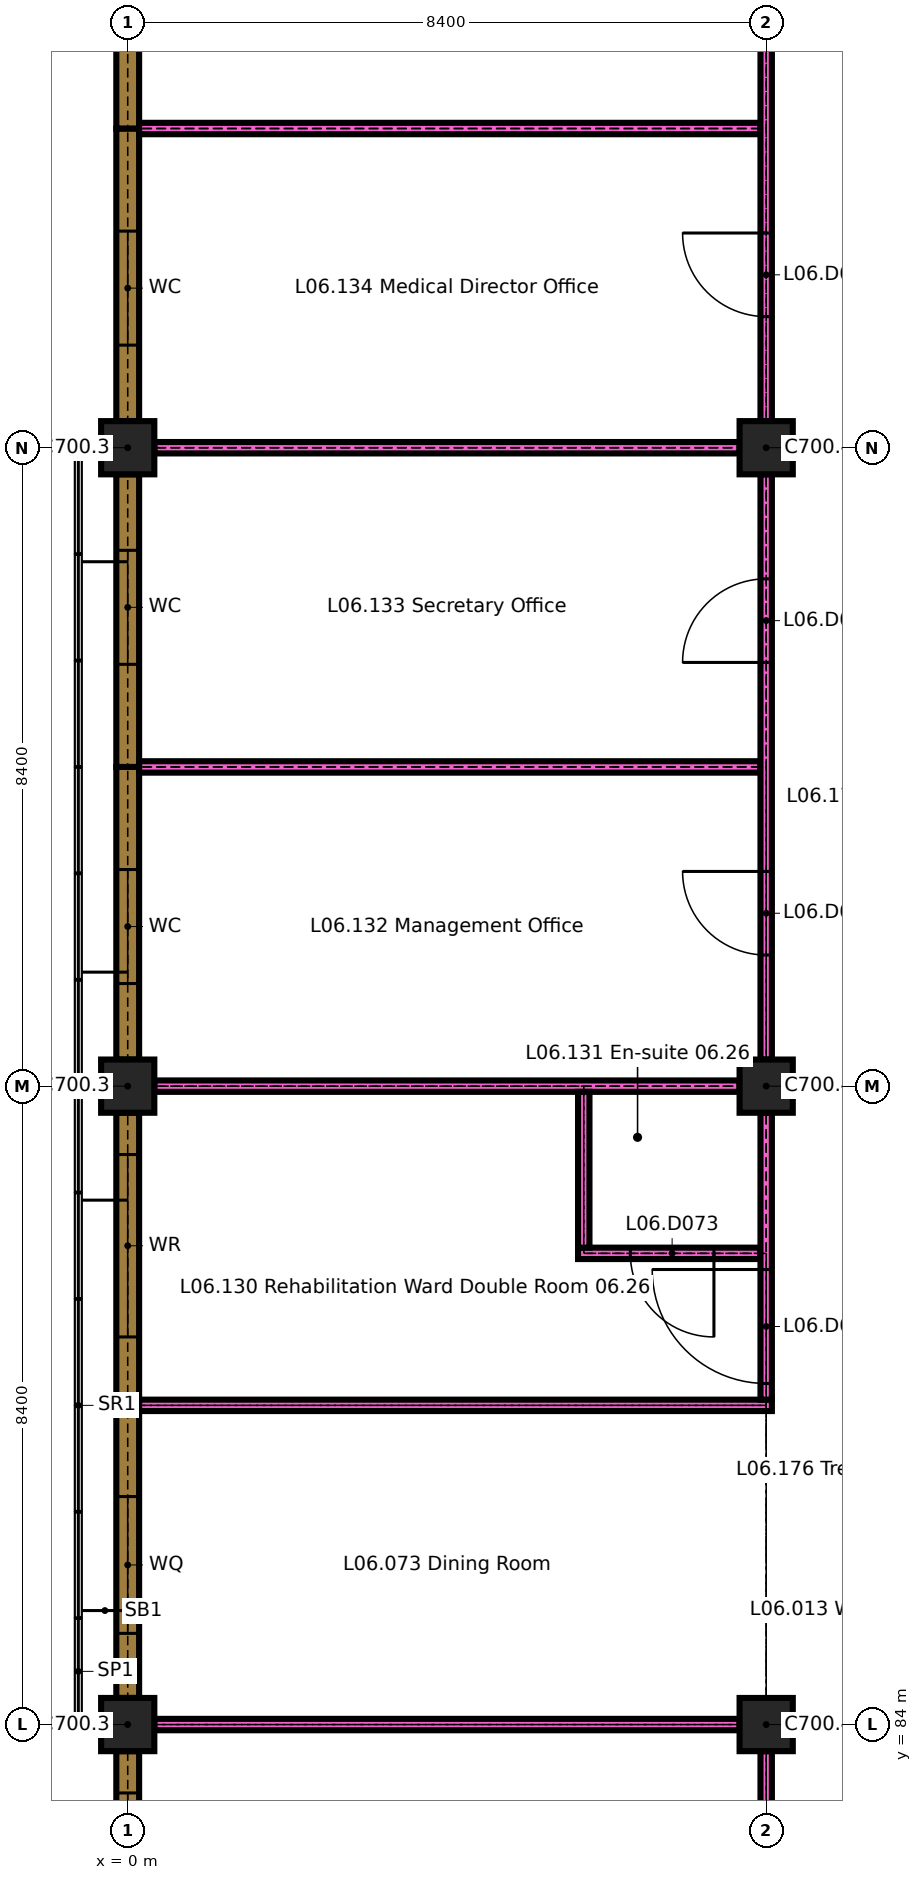
"""IFC4 building model, lengths in metres.
Left out: names, types, materials, properties, quantities, classifications, styles, units other than length and angle.
Written with IfcOpenShell. Run it as: python <this file> out.ifc"""

import sys

from ifc_helpers import new_model, si_unit, direction, frame, frame_2d, origin, origin_2d, place, context, subcontext, project, spatial, rectangle, extrude, element, fill, save


model = new_model("IFC4")
c1 = context("Model", 3, precision=1e-05, world=origin(), true_north=direction((0.0, 1.0)))
c2 = subcontext(c1, "Body", "Model", "MODEL_VIEW")
j1 = project(units=[si_unit("LENGTHUNIT", "METRE"), si_unit("PLANEANGLEUNIT", "RADIAN")], contexts=[c1])
p1 = place(None, origin())
s1 = spatial("IfcSite", under=j1, at=p1, CompositionType="ELEMENT")
p2 = place(p1, origin())
s2 = spatial("IfcBuilding", under=s1, at=p2, CompositionType="ELEMENT")
p3 = place(p2, frame((0.0, 0.0, 26.1)))
s3 = spatial("IfcBuildingStorey", under=s2, at=p3, CompositionType="ELEMENT", Elevation=26.1)
p4 = place(p3, frame((0.0, 84.0, 0.0), z_axis=(0.0, 0.0, 1.0), x_axis=(1.0, 0.0, 0.0)))
e1 = element("IfcColumn", 1, at=p4, inside=s3, PredefinedType="COLUMN", context=c2, shape_type="SweptSolid", body=[
    extrude(rectangle(XDim=0.7, YDim=0.7, at=origin_2d()), origin(), (0.0, 0.0, 1.0), 3.2),
])
p5 = place(p3, frame((8.4, 84.0, 0.0), z_axis=(0.0, 0.0, 1.0), x_axis=(1.0, 0.0, 0.0)))
e2 = element("IfcColumn", 2, at=p5, inside=s3, PredefinedType="COLUMN", context=c2, shape_type="SweptSolid", body=[
    extrude(rectangle(XDim=0.7, YDim=0.7, at=origin_2d()), origin(), (0.0, 0.0, 1.0), 3.3),
])
p6 = place(p3, frame((0.0, 92.4, 0.0), z_axis=(0.0, 0.0, 1.0), x_axis=(1.0, 0.0, 0.0)))
e3 = element("IfcColumn", 3, at=p6, inside=s3, PredefinedType="COLUMN", context=c2, shape_type="SweptSolid", body=[
    extrude(rectangle(XDim=0.7, YDim=0.7, at=origin_2d()), origin(), (0.0, 0.0, 1.0), 3.2),
])
p7 = place(p3, frame((8.4, 92.4, 0.0), z_axis=(0.0, 0.0, 1.0), x_axis=(1.0, 0.0, 0.0)))
e4 = element("IfcColumn", 4, at=p7, inside=s3, PredefinedType="COLUMN", context=c2, shape_type="SweptSolid", body=[
    extrude(rectangle(XDim=0.7, YDim=0.7, at=origin_2d()), origin(), (0.0, 0.0, 1.0), 3.3),
])
p8 = place(p3, frame((0.0, 100.8, 0.0), z_axis=(0.0, 0.0, 1.0), x_axis=(1.0, 0.0, 0.0)))
e5 = element("IfcColumn", 5, at=p8, inside=s3, PredefinedType="COLUMN", context=c2, shape_type="SweptSolid", body=[
    extrude(rectangle(XDim=0.7, YDim=0.7, at=origin_2d()), origin(), (0.0, 0.0, 1.0), 3.2),
])
p9 = place(p3, frame((8.4, 100.8, 0.0), z_axis=(0.0, 0.0, 1.0), x_axis=(1.0, 0.0, 0.0)))
e6 = element("IfcColumn", 6, at=p9, inside=s3, PredefinedType="COLUMN", context=c2, shape_type="SweptSolid", body=[
    extrude(rectangle(XDim=0.7, YDim=0.7, at=origin_2d()), origin(), (0.0, 0.0, 1.0), 3.3),
])
p10 = place(p3, frame((0.0, 75.6, 0.0), z_axis=(0.0, 0.0, 1.0), x_axis=(0.0, 1.0, 0.0)))
e7 = element("IfcWall", 7, at=p10, inside=s3, PredefinedType="SOLIDWALL", context=c2, shape_type="SweptSolid", body=[
    extrude(rectangle(XDim=8.05, YDim=0.3, at=frame_2d((4.025, 0.0))), origin(), (0.0, 0.0, 1.0), 2.9),
])
p11 = place(p10, frame((0.9, 0.0, 0.6)))
e8 = element("IfcOpeningElement", 8, at=p11, cuts=e7, PredefinedType="OPENING", context=c2, shape_type="SweptSolid", body=[
    extrude(rectangle(XDim=2.4, YDim=1.8, at=frame_2d((1.2, 0.9))), frame((0.0, 0.16, 0.0), z_axis=(0.0, -1.0, 0.0), x_axis=(1.0, 0.0, 0.0)), (0.0, 0.0, 1.0), 0.32),
])
p12 = place(p10, frame((5.1, 0.0, 0.6)))
e9 = element("IfcOpeningElement", 9, at=p12, cuts=e7, PredefinedType="OPENING", context=c2, shape_type="SweptSolid", body=[
    extrude(rectangle(XDim=2.4, YDim=1.8, at=frame_2d((1.2, 0.9))), frame((0.0, 0.16, 0.0), z_axis=(0.0, -1.0, 0.0), x_axis=(1.0, 0.0, 0.0)), (0.0, 0.0, 1.0), 0.32),
])
p13 = place(p3, frame((0.0, 84.35, 0.0), z_axis=(0.0, 0.0, 1.0), x_axis=(0.0, 1.0, 0.0)))
e10 = element("IfcWall", 10, at=p13, inside=s3, PredefinedType="SOLIDWALL", context=c2, shape_type="SweptSolid", body=[
    extrude(rectangle(XDim=3.85, YDim=0.3, at=frame_2d((1.925, 0.0))), origin(), (0.0, 0.0, 1.0), 2.9),
])
p14 = place(p13, frame((0.85, 0.0, 1.05)))
e11 = element("IfcOpeningElement", 11, at=p14, cuts=e10, PredefinedType="OPENING", context=c2, shape_type="SweptSolid", body=[
    extrude(rectangle(XDim=1.8, YDim=1.2, at=frame_2d((0.9, 0.6))), frame((0.0, 0.16, 0.0), z_axis=(0.0, -1.0, 0.0), x_axis=(1.0, 0.0, 0.0)), (0.0, 0.0, 1.0), 0.32),
])
p15 = place(p3, frame((0.0, 88.2, 0.0), z_axis=(0.0, 0.0, 1.0), x_axis=(0.0, 1.0, 0.0)))
e12 = element("IfcWall", 12, at=p15, inside=s3, PredefinedType="SOLIDWALL", context=c2, shape_type="SweptSolid", body=[
    extrude(rectangle(XDim=3.85, YDim=0.3, at=frame_2d((1.925, 0.0))), origin(), (0.0, 0.0, 1.0), 2.9),
])
p16 = place(p15, frame((0.9, 0.0, 0.6)))
e13 = element("IfcOpeningElement", 13, at=p16, cuts=e12, PredefinedType="OPENING", context=c2, shape_type="SweptSolid", body=[
    extrude(rectangle(XDim=2.4, YDim=1.8, at=frame_2d((1.2, 0.9))), frame((0.0, 0.16, 0.0), z_axis=(0.0, -1.0, 0.0), x_axis=(1.0, 0.0, 0.0)), (0.0, 0.0, 1.0), 0.32),
])
p17 = place(p3, frame((0.0, 92.75, 0.0), z_axis=(0.0, 0.0, 1.0), x_axis=(0.0, 1.0, 0.0)))
e14 = element("IfcWall", 14, at=p17, inside=s3, PredefinedType="SOLIDWALL", context=c2, shape_type="SweptSolid", body=[
    extrude(rectangle(XDim=3.85, YDim=0.3, at=frame_2d((1.925, 0.0))), origin(), (0.0, 0.0, 1.0), 2.9),
])
p18 = place(p17, frame((1.0, 0.0, 0.9)))
e15 = element("IfcOpeningElement", 15, at=p18, cuts=e14, PredefinedType="OPENING", context=c2, shape_type="SweptSolid", body=[
    extrude(rectangle(XDim=1.5, YDim=1.5, at=frame_2d((0.75, 0.75))), frame((0.0, 0.16, 0.0), z_axis=(0.0, -1.0, 0.0), x_axis=(1.0, 0.0, 0.0)), (0.0, 0.0, 1.0), 0.32),
])
p19 = place(p3, frame((0.0, 96.6, 0.0), z_axis=(0.0, 0.0, 1.0), x_axis=(0.0, 1.0, 0.0)))
e16 = element("IfcWall", 16, at=p19, inside=s3, PredefinedType="SOLIDWALL", context=c2, shape_type="SweptSolid", body=[
    extrude(rectangle(XDim=3.85, YDim=0.3, at=frame_2d((1.925, 0.0))), origin(), (0.0, 0.0, 1.0), 2.9),
])
p20 = place(p19, frame((1.35, 0.0, 0.9)))
e17 = element("IfcOpeningElement", 17, at=p20, cuts=e16, PredefinedType="OPENING", context=c2, shape_type="SweptSolid", body=[
    extrude(rectangle(XDim=1.5, YDim=1.5, at=frame_2d((0.75, 0.75))), frame((0.0, 0.16, 0.0), z_axis=(0.0, -1.0, 0.0), x_axis=(1.0, 0.0, 0.0)), (0.0, 0.0, 1.0), 0.32),
])
p21 = place(p3, frame((0.0, 101.15, 0.0), z_axis=(0.0, 0.0, 1.0), x_axis=(0.0, 1.0, 0.0)))
e18 = element("IfcWall", 18, at=p21, inside=s3, PredefinedType="SOLIDWALL", context=c2, shape_type="SweptSolid", body=[
    extrude(rectangle(XDim=3.85, YDim=0.3, at=frame_2d((1.925, 0.0))), origin(), (0.0, 0.0, 1.0), 2.9),
])
p22 = place(p21, frame((1.0, 0.0, 0.9)))
e19 = element("IfcOpeningElement", 19, at=p22, cuts=e18, PredefinedType="OPENING", context=c2, shape_type="SweptSolid", body=[
    extrude(rectangle(XDim=1.5, YDim=1.5, at=frame_2d((0.75, 0.75))), frame((0.0, 0.16, 0.0), z_axis=(0.0, -1.0, 0.0), x_axis=(1.0, 0.0, 0.0)), (0.0, 0.0, 1.0), 0.32),
])
p23 = place(p3, frame((0.0, 105.0, 0.0), z_axis=(0.0, 0.0, 1.0), x_axis=(0.0, 1.0, 0.0)))
e20 = element("IfcWall", 20, at=p23, inside=s3, PredefinedType="SOLIDWALL", context=c2, shape_type="SweptSolid", body=[
    extrude(rectangle(XDim=3.85, YDim=0.3, at=frame_2d((1.925, 0.0))), origin(), (0.0, 0.0, 1.0), 2.9),
])
p24 = place(p23, frame((1.35, 0.0, 0.9)))
e21 = element("IfcOpeningElement", 21, at=p24, cuts=e20, PredefinedType="OPENING", context=c2, shape_type="SweptSolid", body=[
    extrude(rectangle(XDim=1.5, YDim=1.5, at=frame_2d((0.75, 0.75))), frame((0.0, 0.16, 0.0), z_axis=(0.0, -1.0, 0.0), x_axis=(1.0, 0.0, 0.0)), (0.0, 0.0, 1.0), 0.32),
])
p25 = place(p3, frame((0.35, 84.0, 0.0), z_axis=(0.0, 0.0, 1.0), x_axis=(1.0, 0.0, 0.0)))
e22 = element("IfcWall", 22, at=p25, inside=s3, PredefinedType="PARTITIONING", context=c2, shape_type="SweptSolid", body=[
    extrude(rectangle(XDim=7.7, YDim=0.15, at=frame_2d((3.85, 0.0))), origin(), (0.0, 0.0, 1.0), 3.3),
])
p26 = place(p3, frame((0.15, 88.2, 0.0), z_axis=(0.0, 0.0, 1.0), x_axis=(1.0, 0.0, 0.0)))
e23 = element("IfcWall", 23, at=p26, inside=s3, PredefinedType="PARTITIONING", context=c2, shape_type="SweptSolid", body=[
    extrude(rectangle(XDim=8.325, YDim=0.15, at=frame_2d((4.163, 0.0))), origin(), (0.0, 0.0, 1.0), 3.3),
])
p27 = place(p3, frame((5.925, 90.2, 0.0), z_axis=(0.0, 0.0, 1.0), x_axis=(1.0, 0.0, 0.0)))
e24 = element("IfcWall", 24, at=p27, inside=s3, PredefinedType="PARTITIONING", context=c2, shape_type="SweptSolid", body=[
    extrude(rectangle(XDim=2.4, YDim=0.15, at=frame_2d((1.2, 0.0))), origin(), (0.0, 0.0, 1.0), 3.3),
])
p28 = place(p27, frame((0.688, 0.0, 0.0)))
e25 = element("IfcOpeningElement", 25, at=p28, cuts=e24, PredefinedType="OPENING", context=c2, shape_type="SweptSolid", body=[
    extrude(rectangle(XDim=1.1, YDim=2.1, at=frame_2d((0.55, 1.05))), frame((0.0, 0.085, 0.0), z_axis=(0.0, -1.0, 0.0), x_axis=(1.0, 0.0, 0.0)), (0.0, 0.0, 1.0), 0.17),
])
p29 = place(p3, frame((0.35, 92.4, 0.0), z_axis=(0.0, 0.0, 1.0), x_axis=(1.0, 0.0, 0.0)))
e26 = element("IfcWall", 26, at=p29, inside=s3, PredefinedType="PARTITIONING", context=c2, shape_type="SweptSolid", body=[
    extrude(rectangle(XDim=7.7, YDim=0.15, at=frame_2d((3.85, 0.0))), origin(), (0.0, 0.0, 1.0), 3.3),
])
p30 = place(p3, frame((0.15, 96.6, 0.0), z_axis=(0.0, 0.0, 1.0), x_axis=(1.0, 0.0, 0.0)))
e27 = element("IfcWall", 27, at=p30, inside=s3, PredefinedType="PARTITIONING", context=c2, shape_type="SweptSolid", body=[
    extrude(rectangle(XDim=8.175, YDim=0.15, at=frame_2d((4.087, 0.0))), origin(), (0.0, 0.0, 1.0), 3.3),
])
p31 = place(p3, frame((0.35, 100.8, 0.0), z_axis=(0.0, 0.0, 1.0), x_axis=(1.0, 0.0, 0.0)))
e28 = element("IfcWall", 28, at=p31, inside=s3, PredefinedType="PARTITIONING", context=c2, shape_type="SweptSolid", body=[
    extrude(rectangle(XDim=7.7, YDim=0.15, at=frame_2d((3.85, 0.0))), origin(), (0.0, 0.0, 1.0), 3.3),
])
p32 = place(p3, frame((0.15, 105.0, 0.0), z_axis=(0.0, 0.0, 1.0), x_axis=(1.0, 0.0, 0.0)))
e29 = element("IfcWall", 29, at=p32, inside=s3, PredefinedType="PARTITIONING", context=c2, shape_type="SweptSolid", body=[
    extrude(rectangle(XDim=8.175, YDim=0.15, at=frame_2d((4.087, 0.0))), origin(), (0.0, 0.0, 1.0), 3.3),
])
p33 = place(p3, frame((6.0, 90.275, 0.0), z_axis=(0.0, 0.0, 1.0), x_axis=(0.0, 1.0, 0.0)))
e30 = element("IfcWall", 30, at=p33, inside=s3, PredefinedType="PARTITIONING", context=c2, shape_type="SweptSolid", body=[
    extrude(rectangle(XDim=2.05, YDim=0.15, at=frame_2d((1.025, 0.0))), origin(), (0.0, 0.0, 1.0), 3.3),
])
p34 = place(p3, frame((8.4, 75.7, 0.0), z_axis=(0.0, 0.0, 1.0), x_axis=(0.0, 1.0, 0.0)))
e31 = element("IfcWall", 31, at=p34, inside=s3, PredefinedType="PARTITIONING", context=c2, shape_type="SweptSolid", body=[
    extrude(rectangle(XDim=7.95, YDim=0.15, at=frame_2d((3.975, 0.0))), origin(), (0.0, 0.0, 1.0), 3.3),
])
p35 = place(p34, frame((4.575, 0.0, 0.0)))
e32 = element("IfcOpeningElement", 32, at=p35, cuts=e31, PredefinedType="OPENING", context=c2, shape_type="SweptSolid", body=[
    extrude(rectangle(XDim=1.5, YDim=2.4, at=frame_2d((0.75, 1.2))), frame((0.0, 0.085, 0.0), z_axis=(0.0, -1.0, 0.0), x_axis=(1.0, 0.0, 0.0)), (0.0, 0.0, 1.0), 0.17),
])
p36 = place(p3, frame((8.4, 88.275, 0.0), z_axis=(0.0, 0.0, 1.0), x_axis=(0.0, 1.0, 0.0)))
e33 = element("IfcWall", 33, at=p36, inside=s3, PredefinedType="PARTITIONING", context=c2, shape_type="SweptSolid", body=[
    extrude(rectangle(XDim=3.775, YDim=0.15, at=frame_2d((1.888, 0.0))), origin(), (0.0, 0.0, 1.0), 3.3),
])
p37 = place(p36, frame((0.212, 0.0, 0.0)))
e34 = element("IfcOpeningElement", 34, at=p37, cuts=e33, PredefinedType="OPENING", context=c2, shape_type="SweptSolid", body=[
    extrude(rectangle(XDim=1.5, YDim=2.4, at=frame_2d((0.75, 1.2))), frame((0.0, 0.085, 0.0), z_axis=(0.0, -1.0, 0.0), x_axis=(1.0, 0.0, 0.0)), (0.0, 0.0, 1.0), 0.17),
])
p38 = place(p3, frame((8.4, 92.75, 0.0), z_axis=(0.0, 0.0, 1.0), x_axis=(0.0, 1.0, 0.0)))
e35 = element("IfcWall", 35, at=p38, inside=s3, PredefinedType="PARTITIONING", context=c2, shape_type="SweptSolid", body=[
    extrude(rectangle(XDim=7.7, YDim=0.15, at=frame_2d((3.85, 0.0))), origin(), (0.0, 0.0, 1.0), 3.3),
])
p39 = place(p38, frame((1.375, 0.0, 0.0)))
e36 = element("IfcOpeningElement", 36, at=p39, cuts=e35, PredefinedType="OPENING", context=c2, shape_type="SweptSolid", body=[
    extrude(rectangle(XDim=1.1, YDim=2.1, at=frame_2d((0.55, 1.05))), frame((0.0, 0.085, 0.0), z_axis=(0.0, -1.0, 0.0), x_axis=(1.0, 0.0, 0.0)), (0.0, 0.0, 1.0), 0.17),
])
p40 = place(p38, frame((5.225, 0.0, 0.0)))
e37 = element("IfcOpeningElement", 37, at=p40, cuts=e35, PredefinedType="OPENING", context=c2, shape_type="SweptSolid", body=[
    extrude(rectangle(XDim=1.1, YDim=2.1, at=frame_2d((0.55, 1.05))), frame((0.0, 0.085, 0.0), z_axis=(0.0, -1.0, 0.0), x_axis=(1.0, 0.0, 0.0)), (0.0, 0.0, 1.0), 0.17),
])
p41 = place(p3, frame((8.4, 101.15, 0.0), z_axis=(0.0, 0.0, 1.0), x_axis=(0.0, 1.0, 0.0)))
e38 = element("IfcWall", 38, at=p41, inside=s3, PredefinedType="PARTITIONING", context=c2, shape_type="SweptSolid", body=[
    extrude(rectangle(XDim=7.7, YDim=0.15, at=frame_2d((3.85, 0.0))), origin(), (0.0, 0.0, 1.0), 3.3),
])
p42 = place(p41, frame((1.375, 0.0, 0.0)))
e39 = element("IfcOpeningElement", 39, at=p42, cuts=e38, PredefinedType="OPENING", context=c2, shape_type="SweptSolid", body=[
    extrude(rectangle(XDim=1.1, YDim=2.1, at=frame_2d((0.55, 1.05))), frame((0.0, 0.085, 0.0), z_axis=(0.0, -1.0, 0.0), x_axis=(1.0, 0.0, 0.0)), (0.0, 0.0, 1.0), 0.17),
])
p43 = place(p41, frame((5.225, 0.0, 0.0)))
e40 = element("IfcOpeningElement", 40, at=p43, cuts=e38, PredefinedType="OPENING", context=c2, shape_type="SweptSolid", body=[
    extrude(rectangle(XDim=1.1, YDim=2.1, at=frame_2d((0.55, 1.05))), frame((0.0, 0.085, 0.0), z_axis=(0.0, -1.0, 0.0), x_axis=(1.0, 0.0, 0.0)), (0.0, 0.0, 1.0), 0.17),
])
p44 = place(p12, origin())
e41 = element("IfcWindow", 41, at=p44, inside=s3, PartitioningType="DOUBLE_PANEL_VERTICAL", PredefinedType="WINDOW", context=c2, shape_type="SweptSolid", body=[
    extrude(rectangle(XDim=2.4, YDim=1.8, at=frame_2d((1.2, 0.9))), frame((0.0, 0.03, 0.0), z_axis=(0.0, -1.0, 0.0), x_axis=(1.0, 0.0, 0.0)), (0.0, 0.0, 1.0), 0.06),
])
fill(e9, e41)
p45 = place(p14, origin())
e42 = element("IfcWindow", 42, at=p45, inside=s3, PartitioningType="DOUBLE_PANEL_VERTICAL", PredefinedType="WINDOW", context=c2, shape_type="SweptSolid", body=[
    extrude(rectangle(XDim=1.8, YDim=1.2, at=frame_2d((0.9, 0.6))), frame((0.0, 0.03, 0.0), z_axis=(0.0, -1.0, 0.0), x_axis=(1.0, 0.0, 0.0)), (0.0, 0.0, 1.0), 0.06),
])
fill(e11, e42)
p46 = place(p16, origin())
e43 = element("IfcWindow", 43, at=p46, inside=s3, PartitioningType="DOUBLE_PANEL_VERTICAL", PredefinedType="WINDOW", context=c2, shape_type="SweptSolid", body=[
    extrude(rectangle(XDim=2.4, YDim=1.8, at=frame_2d((1.2, 0.9))), frame((0.0, 0.03, 0.0), z_axis=(0.0, -1.0, 0.0), x_axis=(1.0, 0.0, 0.0)), (0.0, 0.0, 1.0), 0.06),
])
fill(e13, e43)
p47 = place(p18, origin())
e44 = element("IfcWindow", 44, at=p47, inside=s3, PartitioningType="SINGLE_PANEL", PredefinedType="WINDOW", context=c2, shape_type="SweptSolid", body=[
    extrude(rectangle(XDim=1.5, YDim=1.5, at=frame_2d((0.75, 0.75))), frame((0.0, 0.03, 0.0), z_axis=(0.0, -1.0, 0.0), x_axis=(1.0, 0.0, 0.0)), (0.0, 0.0, 1.0), 0.06),
])
fill(e15, e44)
p48 = place(p20, origin())
e45 = element("IfcWindow", 45, at=p48, inside=s3, PartitioningType="SINGLE_PANEL", PredefinedType="WINDOW", context=c2, shape_type="SweptSolid", body=[
    extrude(rectangle(XDim=1.5, YDim=1.5, at=frame_2d((0.75, 0.75))), frame((0.0, 0.03, 0.0), z_axis=(0.0, -1.0, 0.0), x_axis=(1.0, 0.0, 0.0)), (0.0, 0.0, 1.0), 0.06),
])
fill(e17, e45)
p49 = place(p22, origin())
e46 = element("IfcWindow", 46, at=p49, inside=s3, PartitioningType="SINGLE_PANEL", PredefinedType="WINDOW", context=c2, shape_type="SweptSolid", body=[
    extrude(rectangle(XDim=1.5, YDim=1.5, at=frame_2d((0.75, 0.75))), frame((0.0, 0.03, 0.0), z_axis=(0.0, -1.0, 0.0), x_axis=(1.0, 0.0, 0.0)), (0.0, 0.0, 1.0), 0.06),
])
fill(e19, e46)
p50 = place(p28, origin())
e47 = element("IfcDoor", 47, at=p50, inside=s3, OperationType="SINGLE_SWING_RIGHT", PredefinedType="DOOR", context=c2, shape_type="SweptSolid", body=[
    extrude(rectangle(XDim=1.1, YDim=2.1, at=frame_2d((0.55, 1.05))), frame((0.0, 0.025, 0.0), z_axis=(0.0, -1.0, 0.0), x_axis=(1.0, 0.0, 0.0)), (0.0, 0.0, 1.0), 0.05),
])
fill(e25, e47)
p51 = place(p37, origin())
e48 = element("IfcDoor", 48, at=p51, inside=s3, OperationType="SINGLE_SWING_LEFT", PredefinedType="DOOR", context=c2, shape_type="SweptSolid", body=[
    extrude(rectangle(XDim=1.5, YDim=2.4, at=frame_2d((0.75, 1.2))), frame((0.0, 0.03, 0.0), z_axis=(0.0, -1.0, 0.0), x_axis=(1.0, 0.0, 0.0)), (0.0, 0.0, 1.0), 0.06),
])
fill(e34, e48)
p52 = place(p39, origin())
e49 = element("IfcDoor", 49, at=p52, inside=s3, OperationType="SINGLE_SWING_LEFT", PredefinedType="DOOR", context=c2, shape_type="SweptSolid", body=[
    extrude(rectangle(XDim=1.1, YDim=2.1, at=frame_2d((0.55, 1.05))), frame((0.0, 0.025, 0.0), z_axis=(0.0, -1.0, 0.0), x_axis=(1.0, 0.0, 0.0)), (0.0, 0.0, 1.0), 0.05),
])
fill(e36, e49)
p53 = place(p40, origin())
e50 = element("IfcDoor", 50, at=p53, inside=s3, OperationType="SINGLE_SWING_RIGHT", PredefinedType="DOOR", context=c2, shape_type="SweptSolid", body=[
    extrude(rectangle(XDim=1.1, YDim=2.1, at=frame_2d((0.55, 1.05))), frame((0.0, 0.025, 0.0), z_axis=(0.0, -1.0, 0.0), x_axis=(1.0, 0.0, 0.0)), (0.0, 0.0, 1.0), 0.05),
])
fill(e37, e50)
p54 = place(p42, origin())
e51 = element("IfcDoor", 51, at=p54, inside=s3, OperationType="SINGLE_SWING_LEFT", PredefinedType="DOOR", context=c2, shape_type="SweptSolid", body=[
    extrude(rectangle(XDim=1.1, YDim=2.1, at=frame_2d((0.55, 1.05))), frame((0.0, 0.025, 0.0), z_axis=(0.0, -1.0, 0.0), x_axis=(1.0, 0.0, 0.0)), (0.0, 0.0, 1.0), 0.05),
])
fill(e39, e51)
save(model, sys.argv[1])
